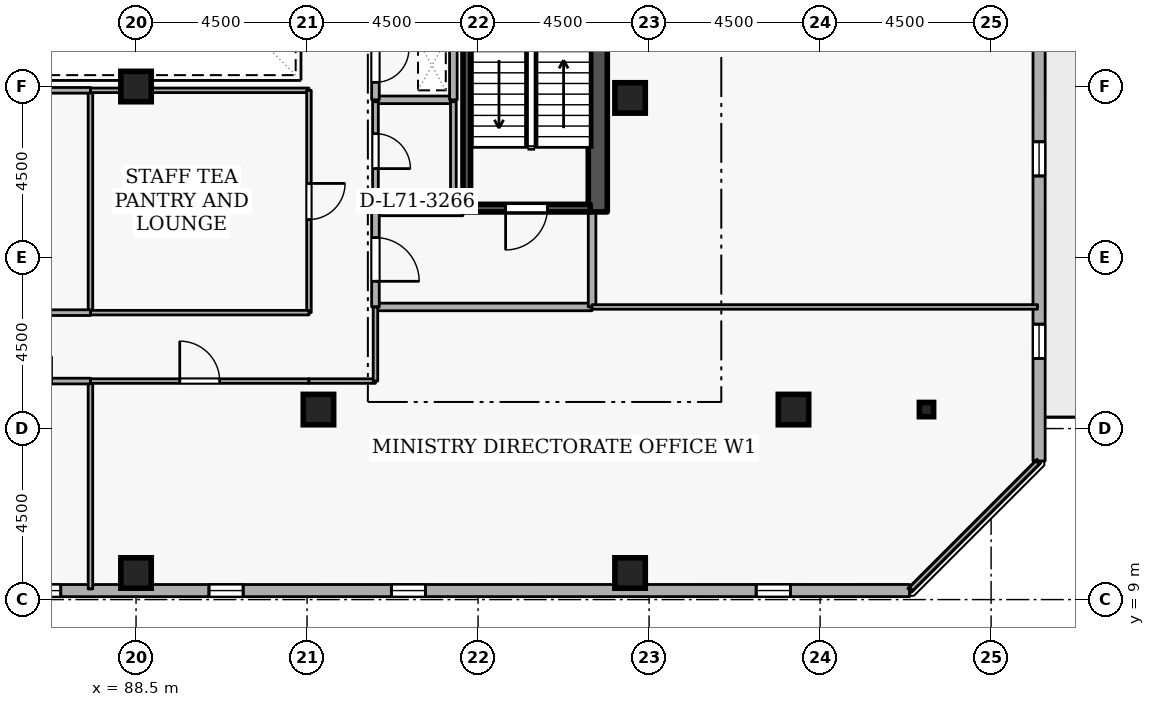
"""IFC4 building model, lengths in metres.
Left out: names, types, materials, properties, quantities, classifications, styles, units other than length and angle.
Written with IfcOpenShell. Run it as: python <this file> out.ifc"""

import sys

from ifc_helpers import new_model, si_unit, direction, frame, frame_2d, origin, origin_2d, place, context, subcontext, project, spatial, rectangle, i_section, extrude, element, fill, save


model = new_model("IFC4")
c1 = context("Model", 3, precision=1e-05, world=origin(), true_north=direction((0.0, 1.0)))
c2 = subcontext(c1, "Body", "Model", "MODEL_VIEW")
j1 = project(units=[si_unit("LENGTHUNIT", "METRE"), si_unit("PLANEANGLEUNIT", "RADIAN")], contexts=[c1])
p1 = place(None, origin())
s1 = spatial("IfcSite", under=j1, at=p1, CompositionType="ELEMENT")
p2 = place(p1, origin())
s2 = spatial("IfcBuilding", under=s1, at=p2, CompositionType="ELEMENT")
p3 = place(p2, frame((0.0, 0.0, 265.5)))
s3 = spatial("IfcBuildingStorey", under=s2, at=p3, CompositionType="ELEMENT", Elevation=265.5)
p4 = place(p3, frame((100.65, 19.2, 0.0), z_axis=(0.0, 0.0, 1.0), x_axis=(0.0, 1.0, 0.0)))
e1 = element("IfcWall", 1, at=p4, inside=s3, PredefinedType="SHEAR", context=c2, shape_type="SweptSolid", body=[
    extrude(rectangle(XDim=15.6, YDim=0.5, at=frame_2d((7.8, 0.0))), origin(), (0.0, 0.0, 1.0), 3.6),
])
for number, where, z_axis, x_axis in (
    (2, (105.8, 14.0, 0.0), (0.0, 0.0, 1.0), (1.0, 0.0, 0.0)),
    (3, (101.5, 9.7, 0.0), (0.0, 0.0, 1.0), (1.0, 0.0, 0.0)),
    (4, (88.5, 9.7, 0.0), (0.0, 0.0, 1.0), (1.0, 0.0, 0.0)),
    (5, (93.3, 14.0, 0.0), (0.0, 0.0, 1.0), (1.0, 0.0, 0.0)),
    (6, (101.5, 22.2, 0.0), (0.0, 0.0, 1.0), (1.0, 0.0, 0.0)),
    (7, (88.5, 22.5, 0.0), (0.0, 0.0, 1.0), (1.0, 0.0, 0.0)),
):
    element("IfcColumn", number, at=place(p3, frame(where, z_axis=z_axis, x_axis=x_axis)), inside=s3, PredefinedType="COLUMN", context=c2, shape_type="SweptSolid", body=[
        extrude(rectangle(XDim=0.8, YDim=0.8, at=origin_2d()), origin(), (0.0, 0.0, 1.0), 3.6),
    ])
p5 = place(p3, frame((109.3, 14.0, 0.0), z_axis=(0.0, 0.0, 1.0), x_axis=(1.0, 0.0, 0.0)))
e8 = element("IfcColumn", 8, at=p5, inside=s3, PredefinedType="COLUMN", context=c2, shape_type="SweptSolid", body=[
    extrude(i_section(OverallWidth=0.375, OverallDepth=0.375, WebThickness=0.017, FlangeThickness=0.027, FilletRadius=0.015, at=origin_2d()), origin(), (0.0, 0.0, 1.0), 3.6),
])
p6 = place(p3, frame((73.319, 9.235, 0.0), z_axis=(0.0, 0.0, 1.0), x_axis=(0.999999997144, 7.5574884e-05, 0.0)))
e9 = element("IfcWall", 9, at=p6, inside=s3, PredefinedType="STANDARD", context=c2, shape_type="SweptSolid", body=[
    extrude(rectangle(XDim=35.535, YDim=0.32, at=frame_2d((17.768, 0.0))), origin(), (0.0, 0.0, 1.0), 2.7),
])
p7 = place(p6, frame((7.5, 0.0, 0.72)))
e10 = element("IfcOpeningElement", 10, at=p7, cuts=e9, PredefinedType="OPENING", context=c2, shape_type="SweptSolid", body=[
    extrude(rectangle(XDim=0.9, YDim=1.75, at=frame_2d((0.45, 0.875))), frame((0.0, 0.17, 0.0), z_axis=(0.0, -1.0, 0.0), x_axis=(1.0, 0.0, 0.0)), (0.0, 0.0, 1.0), 0.34),
])
p8 = place(p6, frame((12.3, 0.0, 0.72)))
e11 = element("IfcOpeningElement", 11, at=p8, cuts=e9, PredefinedType="OPENING", context=c2, shape_type="SweptSolid", body=[
    extrude(rectangle(XDim=0.9, YDim=1.75, at=frame_2d((0.45, 0.875))), frame((0.0, 0.17, 0.0), z_axis=(0.0, -1.0, 0.0), x_axis=(1.0, 0.0, 0.0)), (0.0, 0.0, 1.0), 0.34),
])
p9 = place(p6, frame((17.1, 0.0, 0.72)))
e12 = element("IfcOpeningElement", 12, at=p9, cuts=e9, PredefinedType="OPENING", context=c2, shape_type="SweptSolid", body=[
    extrude(rectangle(XDim=0.9, YDim=1.75, at=frame_2d((0.45, 0.875))), frame((0.0, 0.17, 0.0), z_axis=(0.0, -1.0, 0.0), x_axis=(1.0, 0.0, 0.0)), (0.0, 0.0, 1.0), 0.34),
])
p10 = place(p6, frame((21.9, 0.0, 0.72)))
e13 = element("IfcOpeningElement", 13, at=p10, cuts=e9, PredefinedType="OPENING", context=c2, shape_type="SweptSolid", body=[
    extrude(rectangle(XDim=0.9, YDim=1.75, at=frame_2d((0.45, 0.875))), frame((0.0, 0.17, 0.0), z_axis=(0.0, -1.0, 0.0), x_axis=(1.0, 0.0, 0.0)), (0.0, 0.0, 1.0), 0.34),
])
p11 = place(p6, frame((31.5, 0.0, 0.72)))
e14 = element("IfcOpeningElement", 14, at=p11, cuts=e9, PredefinedType="OPENING", context=c2, shape_type="SweptSolid", body=[
    extrude(rectangle(XDim=0.9, YDim=1.75, at=frame_2d((0.45, 0.875))), frame((0.0, 0.17, 0.0), z_axis=(0.0, -1.0, 0.0), x_axis=(1.0, 0.0, 0.0)), (0.0, 0.0, 1.0), 0.34),
])
p12 = place(p3, frame((112.262, 12.646, 0.0), z_axis=(0.0, 0.0, 1.0), x_axis=(7.5574884e-05, 0.999999997144, 0.0)))
e15 = element("IfcWall", 15, at=p12, inside=s3, PredefinedType="STANDARD", context=c2, shape_type="SweptSolid", body=[
    extrude(rectangle(XDim=35.535, YDim=0.32, at=frame_2d((17.768, 0.0))), origin(), (0.0, 0.0, 1.0), 2.7),
])
p13 = place(p12, frame((22.718, 0.0, 0.0)))
e16 = element("IfcOpeningElement", 16, at=p13, cuts=e15, PredefinedType="OPENING", context=c2, shape_type="SweptSolid", body=[
    extrude(rectangle(XDim=1.0, YDim=2.08, at=frame_2d((0.5, 1.04))), frame((0.0, 0.17, 0.0), z_axis=(0.0, -1.0, 0.0), x_axis=(1.0, 0.0, 0.0)), (0.0, 0.0, 1.0), 0.34),
])
p14 = place(p12, frame((2.7, 0.0, 0.72)))
e17 = element("IfcOpeningElement", 17, at=p14, cuts=e15, PredefinedType="OPENING", context=c2, shape_type="SweptSolid", body=[
    extrude(rectangle(XDim=0.9, YDim=1.75, at=frame_2d((0.45, 0.875))), frame((0.0, 0.17, 0.0), z_axis=(0.0, -1.0, 0.0), x_axis=(1.0, 0.0, 0.0)), (0.0, 0.0, 1.0), 0.34),
])
p15 = place(p12, frame((7.5, 0.0, 0.72)))
e18 = element("IfcOpeningElement", 18, at=p15, cuts=e15, PredefinedType="OPENING", context=c2, shape_type="SweptSolid", body=[
    extrude(rectangle(XDim=0.9, YDim=1.75, at=frame_2d((0.45, 0.875))), frame((0.0, 0.17, 0.0), z_axis=(0.0, -1.0, 0.0), x_axis=(1.0, 0.0, 0.0)), (0.0, 0.0, 1.0), 0.34),
])
p16 = place(p12, frame((12.3, 0.0, 0.72)))
e19 = element("IfcOpeningElement", 19, at=p16, cuts=e15, PredefinedType="OPENING", context=c2, shape_type="SweptSolid", body=[
    extrude(rectangle(XDim=0.9, YDim=1.75, at=frame_2d((0.45, 0.875))), frame((0.0, 0.17, 0.0), z_axis=(0.0, -1.0, 0.0), x_axis=(1.0, 0.0, 0.0)), (0.0, 0.0, 1.0), 0.34),
])
p17 = place(p12, frame((17.1, 0.0, 0.72)))
e20 = element("IfcOpeningElement", 20, at=p17, cuts=e15, PredefinedType="OPENING", context=c2, shape_type="SweptSolid", body=[
    extrude(rectangle(XDim=0.9, YDim=1.75, at=frame_2d((0.45, 0.875))), frame((0.0, 0.17, 0.0), z_axis=(0.0, -1.0, 0.0), x_axis=(1.0, 0.0, 0.0)), (0.0, 0.0, 1.0), 0.34),
])
p18 = place(p12, frame((26.7, 0.0, 0.72)))
e21 = element("IfcOpeningElement", 21, at=p18, cuts=e15, PredefinedType="OPENING", context=c2, shape_type="SweptSolid", body=[
    extrude(rectangle(XDim=0.9, YDim=1.75, at=frame_2d((0.45, 0.875))), frame((0.0, 0.17, 0.0), z_axis=(0.0, -1.0, 0.0), x_axis=(1.0, 0.0, 0.0)), (0.0, 0.0, 1.0), 0.34),
])
p19 = place(p12, frame((31.5, 0.0, 0.72)))
e22 = element("IfcOpeningElement", 22, at=p19, cuts=e15, PredefinedType="OPENING", context=c2, shape_type="SweptSolid", body=[
    extrude(rectangle(XDim=0.9, YDim=1.75, at=frame_2d((0.45, 0.875))), frame((0.0, 0.17, 0.0), z_axis=(0.0, -1.0, 0.0), x_axis=(1.0, 0.0, 0.0)), (0.0, 0.0, 1.0), 0.34),
])
p20 = place(p3, frame((100.45, 19.3, 0.0), z_axis=(0.0, 0.0, 1.0), x_axis=(-1.0, 0.0, 0.0)))
e23 = element("IfcWall", 23, at=p20, inside=s3, PredefinedType="SHEAR", context=c2, shape_type="SweptSolid", body=[
    extrude(rectangle(XDim=3.35, YDim=0.2, at=frame_2d((1.675, 0.0))), origin(), (0.0, 0.0, 1.0), 3.6),
])
p21 = place(p20, frame((1.125, 0.0, 0.0)))
e24 = element("IfcOpeningElement", 24, at=p21, cuts=e23, PredefinedType="OPENING", context=c2, shape_type="SweptSolid", body=[
    extrude(rectangle(XDim=1.1, YDim=2.1, at=frame_2d((0.55, 1.05))), frame((0.0, 0.11, 0.0), z_axis=(0.0, -1.0, 0.0), x_axis=(1.0, 0.0, 0.0)), (0.0, 0.0, 1.0), 0.22),
])
p22 = place(p3, frame((97.203, 26.55, 0.0), z_axis=(0.0, 0.0, 1.0), x_axis=(0.0, -1.0, 0.0)))
e25 = element("IfcWall", 25, at=p22, inside=s3, PredefinedType="SHEAR", context=c2, shape_type="SweptSolid", body=[
    extrude(rectangle(XDim=7.1, YDim=0.2, at=frame_2d((3.55, 0.0))), origin(), (0.0, 0.0, 1.0), 3.6),
])
p23 = place(p3, frame((94.8, 16.7, 0.0), z_axis=(0.0, 0.0, 1.0), x_axis=(1.0, 0.0, 0.0)))
e26 = element("IfcWall", 26, at=p23, inside=s3, PredefinedType="STANDARD", context=c2, shape_type="SweptSolid", body=[
    extrude(rectangle(XDim=5.7, YDim=0.2, at=frame_2d((2.85, 0.0))), origin(), (0.0, 0.0, 1.0), 3.34),
])
p24 = place(p3, frame((100.5, 16.7, 0.0), z_axis=(0.0, 0.0, 1.0), x_axis=(0.0, 1.0, 0.0)))
e27 = element("IfcWall", 27, at=p24, inside=s3, PredefinedType="STANDARD", context=c2, shape_type="SweptSolid", body=[
    extrude(rectangle(XDim=2.5, YDim=0.2, at=frame_2d((1.25, 0.0))), origin(), (0.0, 0.0, 1.0), 3.34),
])
p25 = place(p3, frame((97.1, 19.2, 0.0), z_axis=(0.0, 0.0, 1.0), x_axis=(-1.0, 0.0, 0.0)))
e28 = element("IfcWall", 28, at=p25, inside=s3, PredefinedType="STANDARD", context=c2, shape_type="SweptSolid", body=[
    extrude(rectangle(XDim=2.3, YDim=0.2, at=frame_2d((1.15, 0.0))), origin(), (0.0, 0.0, 1.0), 2.545),
])
p26 = place(p3, frame((94.8, 19.2, 0.0), z_axis=(0.0, 0.0, 1.0), x_axis=(0.0, -1.0, 0.0)))
e29 = element("IfcWall", 29, at=p26, inside=s3, PredefinedType="STANDARD", context=c2, shape_type="SweptSolid", body=[
    extrude(rectangle(XDim=2.5, YDim=0.2, at=frame_2d((1.25, 0.0))), origin(), (0.0, 0.0, 1.0), 3.34),
])
p27 = place(p26, frame((0.675, 0.0, 0.0)))
e30 = element("IfcOpeningElement", 30, at=p27, cuts=e29, PredefinedType="OPENING", context=c2, shape_type="SweptSolid", body=[
    extrude(rectangle(XDim=1.15, YDim=2.1, at=frame_2d((0.575, 1.05))), frame((0.0, 0.11, 0.0), z_axis=(0.0, -1.0, 0.0), x_axis=(1.0, 0.0, 0.0)), (0.0, 0.0, 1.0), 0.22),
])
p28 = place(p3, frame((94.8, 22.15, 0.0), z_axis=(0.0, 0.0, 1.0), x_axis=(1.0, 0.0, 0.0)))
e31 = element("IfcWall", 31, at=p28, inside=s3, PredefinedType="STANDARD", context=c2, shape_type="SweptSolid", body=[
    extrude(rectangle(XDim=2.05, YDim=0.2, at=frame_2d((1.025, 0.0))), origin(), (0.0, 0.0, 1.0), 3.34),
])
p29 = place(p3, frame((96.85, 22.15, 0.0), z_axis=(0.0, 0.0, 1.0), x_axis=(0.0, 1.0, 0.0)))
e32 = element("IfcWall", 32, at=p29, inside=s3, PredefinedType="STANDARD", context=c2, shape_type="SweptSolid", body=[
    extrude(rectangle(XDim=1.8, YDim=0.2, at=frame_2d((0.9, 0.0))), origin(), (0.0, 0.0, 1.0), 3.34),
])
p30 = place(p3, frame((94.8, 23.95, 0.0), z_axis=(0.0, 0.0, 1.0), x_axis=(0.0, -1.0, 0.0)))
e33 = element("IfcWall", 33, at=p30, inside=s3, PredefinedType="STANDARD", context=c2, shape_type="SweptSolid", body=[
    extrude(rectangle(XDim=1.8, YDim=0.2, at=frame_2d((0.9, 0.0))), origin(), (0.0, 0.0, 1.0), 3.34),
])
p31 = place(p30, frame((0.46, 0.0, 0.0)))
e34 = element("IfcOpeningElement", 34, at=p31, cuts=e33, PredefinedType="OPENING", context=c2, shape_type="SweptSolid", body=[
    extrude(rectangle(XDim=0.88, YDim=2.04, at=frame_2d((0.44, 1.02))), frame((0.0, 0.11, 0.0), z_axis=(0.0, -1.0, 0.0), x_axis=(1.0, 0.0, 0.0)), (0.0, 0.0, 1.0), 0.22),
])
p32 = place(p3, frame((94.8, 19.5, 0.0), z_axis=(0.0, 0.0, 1.0), x_axis=(1.0, 0.0, 0.0)))
e35 = element("IfcWall", 35, at=p32, inside=s3, PredefinedType="PARTITIONING", context=c2, shape_type="SweptSolid", body=[
    extrude(rectangle(XDim=2.05, YDim=0.15, at=frame_2d((1.025, 0.0))), origin(), (0.0, 0.0, 1.0), 2.545),
])
p33 = place(p3, frame((96.85, 19.5, 0.0), z_axis=(0.0, 0.0, 1.0), x_axis=(0.0, 1.0, 0.0)))
e36 = element("IfcWall", 36, at=p33, inside=s3, PredefinedType="PARTITIONING", context=c2, shape_type="SweptSolid", body=[
    extrude(rectangle(XDim=2.6, YDim=0.15, at=frame_2d((1.3, 0.0))), origin(), (0.0, 0.0, 1.0), 3.34),
])
p34 = place(p3, frame((94.8, 22.1, 0.0), z_axis=(0.0, 0.0, 1.0), x_axis=(0.0, -1.0, 0.0)))
e37 = element("IfcWall", 37, at=p34, inside=s3, PredefinedType="PARTITIONING", context=c2, shape_type="SweptSolid", body=[
    extrude(rectangle(XDim=2.6, YDim=0.15, at=frame_2d((1.3, 0.0))), origin(), (0.0, 0.0, 1.0), 3.34),
])
p35 = place(p34, frame((0.84, 0.0, 0.0)))
e38 = element("IfcOpeningElement", 38, at=p35, cuts=e37, PredefinedType="OPENING", context=c2, shape_type="SweptSolid", body=[
    extrude(rectangle(XDim=0.92, YDim=2.08, at=frame_2d((0.46, 1.04))), frame((0.0, 0.085, 0.0), z_axis=(0.0, -1.0, 0.0), x_axis=(1.0, 0.0, 0.0)), (0.0, 0.0, 1.0), 0.17),
])
p36 = place(p3, frame((87.3, 9.28, 0.0), z_axis=(0.0, 0.0, 1.0), x_axis=(0.0, 1.0, 0.0)))
e39 = element("IfcWall", 39, at=p36, inside=s3, PredefinedType="PARTITIONING", context=c2, shape_type="SweptSolid", body=[
    extrude(rectangle(XDim=5.47, YDim=0.12, at=frame_2d((2.735, 0.0))), origin(), (0.0, 0.0, 1.0), 3.34),
])
p37 = place(p3, frame((87.3, 14.75, 0.0), z_axis=(0.0, 0.0, 1.0), x_axis=(1.0, 0.0, 0.0)))
e40 = element("IfcWall", 40, at=p37, inside=s3, PredefinedType="PARTITIONING", context=c2, shape_type="SweptSolid", body=[
    extrude(rectangle(XDim=5.75, YDim=0.12, at=frame_2d((2.875, 0.0))), origin(), (0.0, 0.0, 1.0), 3.34),
])
p38 = place(p37, frame((2.35, 0.0, 0.0)))
e41 = element("IfcOpeningElement", 41, at=p38, cuts=e40, PredefinedType="OPENING", context=c2, shape_type="SweptSolid", body=[
    extrude(rectangle(XDim=1.05, YDim=2.1, at=frame_2d((0.525, 1.05))), frame((0.0, 0.07, 0.0), z_axis=(0.0, -1.0, 0.0), x_axis=(1.0, 0.0, 0.0)), (0.0, 0.0, 1.0), 0.14),
])
p39 = place(p3, frame((93.05, 14.75, 0.0), z_axis=(0.0, 0.0, 1.0), x_axis=(1.0, 0.0, 0.0)))
e42 = element("IfcWall", 42, at=p39, inside=s3, PredefinedType="PARTITIONING", context=c2, shape_type="SweptSolid", body=[
    extrude(rectangle(XDim=1.75, YDim=0.12, at=frame_2d((0.875, 0.0))), origin(), (0.0, 0.0, 1.0), 3.34),
])
p40 = place(p3, frame((94.8, 14.75, 0.0), z_axis=(0.0, 0.0, 1.0), x_axis=(0.0, 1.0, 0.0)))
e43 = element("IfcWall", 43, at=p40, inside=s3, PredefinedType="PARTITIONING", context=c2, shape_type="SweptSolid", body=[
    extrude(rectangle(XDim=1.95, YDim=0.12, at=frame_2d((0.975, 0.0))), origin(), (0.0, 0.0, 1.0), 3.34),
])
p41 = place(p3, frame((100.5, 16.7, 0.0), z_axis=(0.0, 0.0, 1.0), x_axis=(1.0, 0.0, 0.0)))
e44 = element("IfcWall", 44, at=p41, inside=s3, PredefinedType="PARTITIONING", context=c2, shape_type="SweptSolid", body=[
    extrude(rectangle(XDim=11.72, YDim=0.12, at=frame_2d((5.86, 0.0))), origin(), (0.0, 0.0, 1.0), 3.34),
])
p42 = place(p3, frame((112.22, 12.606, 0.0), z_axis=(0.0, 0.0, 1.0), x_axis=(-0.707106781187, -0.707106781187, 0.0)))
e45 = element("IfcWall", 45, at=p42, inside=s3, PredefinedType="PARTITIONING", context=c2, shape_type="SweptSolid", body=[
    extrude(rectangle(XDim=4.703, YDim=0.12, at=frame_2d((2.352, 0.0))), origin(), (0.0, 0.0, 1.0), 3.34),
])
p43 = place(p3, frame((83.95, 14.75, 0.0), z_axis=(0.0, 0.0, 1.0), x_axis=(1.0, 0.0, 0.0)))
e46 = element("IfcWall", 46, at=p43, inside=s3, PredefinedType="PARTITIONING", context=c2, shape_type="SweptSolid", body=[
    extrude(rectangle(XDim=3.35, YDim=0.15, at=frame_2d((1.675, 0.0))), origin(), (0.0, 0.0, 1.0), 3.34),
])
p44 = place(p43, frame((1.025, 0.0, 0.0)))
e47 = element("IfcOpeningElement", 47, at=p44, cuts=e46, PredefinedType="OPENING", context=c2, shape_type="SweptSolid", body=[
    extrude(rectangle(XDim=1.3, YDim=2.12, at=frame_2d((0.65, 1.06))), frame((0.0, 0.085, 0.0), z_axis=(0.0, -1.0, 0.0), x_axis=(1.0, 0.0, 0.0)), (0.0, 0.0, 1.0), 0.17),
])
p45 = place(p3, frame((87.3, 16.55, 0.0), z_axis=(0.0, 0.0, 1.0), x_axis=(0.0, 1.0, 0.0)))
e48 = element("IfcWall", 48, at=p45, inside=s3, PredefinedType="PARTITIONING", context=c2, shape_type="SweptSolid", body=[
    extrude(rectangle(XDim=5.85, YDim=0.12, at=frame_2d((2.925, 0.0))), origin(), (0.0, 0.0, 1.0), 3.34),
])
p46 = place(p3, frame((87.3, 22.4, 0.0), z_axis=(0.0, 0.0, 1.0), x_axis=(1.0, 0.0, 0.0)))
e49 = element("IfcWall", 49, at=p46, inside=s3, PredefinedType="PARTITIONING", context=c2, shape_type="SweptSolid", body=[
    extrude(rectangle(XDim=5.75, YDim=0.12, at=frame_2d((2.875, 0.0))), origin(), (0.0, 0.0, 1.0), 3.34),
])
p47 = place(p3, frame((93.05, 22.4, 0.0), z_axis=(0.0, 0.0, 1.0), x_axis=(0.0, -1.0, 0.0)))
e50 = element("IfcWall", 50, at=p47, inside=s3, PredefinedType="PARTITIONING", context=c2, shape_type="SweptSolid", body=[
    extrude(rectangle(XDim=5.85, YDim=0.12, at=frame_2d((2.925, 0.0))), origin(), (0.0, 0.0, 1.0), 3.34),
])
p48 = place(p47, frame((2.45, 0.0, 0.0)))
e51 = element("IfcOpeningElement", 51, at=p48, cuts=e50, PredefinedType="OPENING", context=c2, shape_type="SweptSolid", body=[
    extrude(rectangle(XDim=0.95, YDim=2.1, at=frame_2d((0.475, 1.05))), frame((0.0, 0.07, 0.0), z_axis=(0.0, -1.0, 0.0), x_axis=(1.0, 0.0, 0.0)), (0.0, 0.0, 1.0), 0.14),
])
p49 = place(p3, frame((93.05, 16.55, 0.0), z_axis=(0.0, 0.0, 1.0), x_axis=(-1.0, 0.0, 0.0)))
e52 = element("IfcWall", 52, at=p49, inside=s3, PredefinedType="PARTITIONING", context=c2, shape_type="SweptSolid", body=[
    extrude(rectangle(XDim=5.75, YDim=0.12, at=frame_2d((2.875, 0.0))), origin(), (0.0, 0.0, 1.0), 3.34),
])
for number, where, z_axis, x_axis in (
    (53, (83.95, 22.4, 0.0), (0.0, 0.0, 1.0), (1.0, 0.0, 0.0)),
    (54, (87.3, 16.55, 0.0), (0.0, 0.0, 1.0), (-1.0, 0.0, 0.0)),
):
    element("IfcWall", number, at=place(p3, frame(where, z_axis=z_axis, x_axis=x_axis)), inside=s3, PredefinedType="PARTITIONING", context=c2, shape_type="SweptSolid", body=[
        extrude(rectangle(XDim=3.35, YDim=0.15, at=frame_2d((1.675, 0.0))), origin(), (0.0, 0.0, 1.0), 3.34),
    ])
p50 = place(p8, origin())
e55 = element("IfcWindow", 55, at=p50, inside=s3, PartitioningType="SINGLE_PANEL", PredefinedType="WINDOW", context=c2, shape_type="SweptSolid", body=[
    extrude(rectangle(XDim=0.9, YDim=1.75, at=frame_2d((0.45, 0.875))), frame((0.0, 0.03, 0.0), z_axis=(0.0, -1.0, 0.0), x_axis=(1.0, 0.0, 0.0)), (0.0, 0.0, 1.0), 0.06),
])
fill(e11, e55)
p51 = place(p9, origin())
e56 = element("IfcWindow", 56, at=p51, inside=s3, PartitioningType="SINGLE_PANEL", PredefinedType="WINDOW", context=c2, shape_type="SweptSolid", body=[
    extrude(rectangle(XDim=0.9, YDim=1.75, at=frame_2d((0.45, 0.875))), frame((0.0, 0.03, 0.0), z_axis=(0.0, -1.0, 0.0), x_axis=(1.0, 0.0, 0.0)), (0.0, 0.0, 1.0), 0.06),
])
fill(e12, e56)
p52 = place(p10, origin())
e57 = element("IfcWindow", 57, at=p52, inside=s3, PartitioningType="SINGLE_PANEL", PredefinedType="WINDOW", context=c2, shape_type="SweptSolid", body=[
    extrude(rectangle(XDim=0.9, YDim=1.75, at=frame_2d((0.45, 0.875))), frame((0.0, 0.03, 0.0), z_axis=(0.0, -1.0, 0.0), x_axis=(1.0, 0.0, 0.0)), (0.0, 0.0, 1.0), 0.06),
])
fill(e13, e57)
p53 = place(p11, origin())
e58 = element("IfcWindow", 58, at=p53, inside=s3, PartitioningType="SINGLE_PANEL", PredefinedType="WINDOW", context=c2, shape_type="SweptSolid", body=[
    extrude(rectangle(XDim=0.9, YDim=1.75, at=frame_2d((0.45, 0.875))), frame((0.0, 0.03, 0.0), z_axis=(0.0, -1.0, 0.0), x_axis=(1.0, 0.0, 0.0)), (0.0, 0.0, 1.0), 0.06),
])
fill(e14, e58)
p54 = place(p14, origin())
e59 = element("IfcWindow", 59, at=p54, inside=s3, PartitioningType="SINGLE_PANEL", PredefinedType="WINDOW", context=c2, shape_type="SweptSolid", body=[
    extrude(rectangle(XDim=0.9, YDim=1.75, at=frame_2d((0.45, 0.875))), frame((0.0, 0.03, 0.0), z_axis=(0.0, -1.0, 0.0), x_axis=(1.0, 0.0, 0.0)), (0.0, 0.0, 1.0), 0.06),
])
fill(e17, e59)
p55 = place(p15, origin())
e60 = element("IfcWindow", 60, at=p55, inside=s3, PartitioningType="SINGLE_PANEL", PredefinedType="WINDOW", context=c2, shape_type="SweptSolid", body=[
    extrude(rectangle(XDim=0.9, YDim=1.75, at=frame_2d((0.45, 0.875))), frame((0.0, 0.03, 0.0), z_axis=(0.0, -1.0, 0.0), x_axis=(1.0, 0.0, 0.0)), (0.0, 0.0, 1.0), 0.06),
])
fill(e18, e60)
p56 = place(p21, origin())
e61 = element("IfcDoor", 61, at=p56, inside=s3, OperationType="SINGLE_SWING_RIGHT", PredefinedType="DOOR", context=c2, shape_type="SweptSolid", body=[
    extrude(rectangle(XDim=1.1, YDim=2.1, at=frame_2d((0.55, 1.05))), frame((0.0, 0.025, 0.0), z_axis=(0.0, -1.0, 0.0), x_axis=(1.0, 0.0, 0.0)), (0.0, 0.0, 1.0), 0.05),
])
fill(e24, e61)
p57 = place(p27, origin())
e62 = element("IfcDoor", 62, at=p57, inside=s3, OperationType="SINGLE_SWING_RIGHT", PredefinedType="DOOR", context=c2, shape_type="SweptSolid", body=[
    extrude(rectangle(XDim=1.15, YDim=2.1, at=frame_2d((0.575, 1.05))), frame((0.0, 0.025, 0.0), z_axis=(0.0, -1.0, 0.0), x_axis=(1.0, 0.0, 0.0)), (0.0, 0.0, 1.0), 0.05),
])
fill(e30, e62)
p58 = place(p31, origin())
e63 = element("IfcDoor", 63, at=p58, inside=s3, OperationType="SINGLE_SWING_LEFT", PredefinedType="DOOR", context=c2, shape_type="SweptSolid", body=[
    extrude(rectangle(XDim=0.88, YDim=2.04, at=frame_2d((0.44, 1.02))), frame((0.0, 0.025, 0.0), z_axis=(0.0, -1.0, 0.0), x_axis=(1.0, 0.0, 0.0)), (0.0, 0.0, 1.0), 0.05),
])
fill(e34, e63)
p59 = place(p35, origin())
e64 = element("IfcDoor", 64, at=p59, inside=s3, OperationType="SINGLE_SWING_RIGHT", PredefinedType="DOOR", context=c2, shape_type="SweptSolid", body=[
    extrude(rectangle(XDim=0.92, YDim=2.08, at=frame_2d((0.46, 1.04))), frame((0.0, 0.025, 0.0), z_axis=(0.0, -1.0, 0.0), x_axis=(1.0, 0.0, 0.0)), (0.0, 0.0, 1.0), 0.05),
])
fill(e38, e64)
p60 = place(p38, origin())
e65 = element("IfcDoor", 65, at=p60, inside=s3, OperationType="SINGLE_SWING_LEFT", PredefinedType="DOOR", context=c2, shape_type="SweptSolid", body=[
    extrude(rectangle(XDim=1.05, YDim=2.1, at=frame_2d((0.525, 1.05))), frame((0.0, 0.025, 0.0), z_axis=(0.0, -1.0, 0.0), x_axis=(1.0, 0.0, 0.0)), (0.0, 0.0, 1.0), 0.05),
])
fill(e41, e65)
p61 = place(p48, origin())
e66 = element("IfcDoor", 66, at=p61, inside=s3, OperationType="SINGLE_SWING_LEFT", PredefinedType="DOOR", context=c2, shape_type="SweptSolid", body=[
    extrude(rectangle(XDim=0.95, YDim=2.1, at=frame_2d((0.475, 1.05))), frame((0.0, 0.025, 0.0), z_axis=(0.0, -1.0, 0.0), x_axis=(1.0, 0.0, 0.0)), (0.0, 0.0, 1.0), 0.05),
])
fill(e51, e66)
save(model, sys.argv[1])
